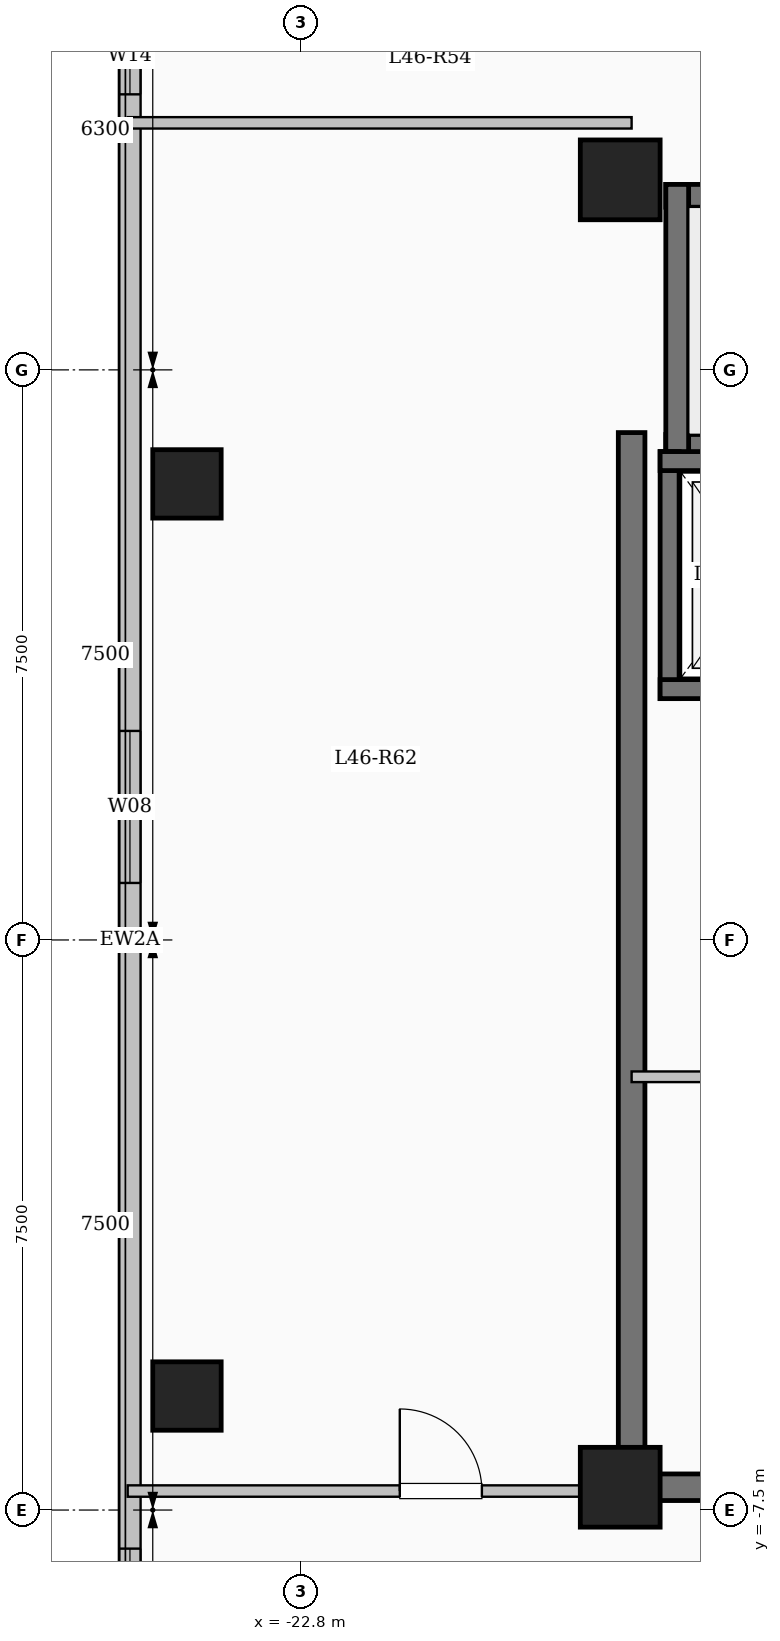
"""IFC4 building model, lengths in metres.
Left out: names, types, materials, properties, quantities, classifications, styles, units other than length and angle.
Written with IfcOpenShell. Run it as: python <this file> out.ifc"""

import sys

from ifc_helpers import new_model, si_unit, direction, frame, frame_2d, origin, origin_2d, place, context, subcontext, project, spatial, rectangle, extrude, element, fill, save


model = new_model("IFC4")
c1 = context("Model", 3, precision=1e-05, world=origin(), true_north=direction((0.0, 1.0)))
c2 = subcontext(c1, "Body", "Model", "MODEL_VIEW")
j1 = project(units=[si_unit("LENGTHUNIT", "METRE"), si_unit("PLANEANGLEUNIT", "RADIAN")], contexts=[c1])
p1 = place(None, origin())
s1 = spatial("IfcSite", under=j1, at=p1, CompositionType="ELEMENT")
p2 = place(p1, origin())
s2 = spatial("IfcBuilding", under=s1, at=p2, CompositionType="ELEMENT")
p3 = place(p2, frame((0.0, 0.0, 169.45)))
s3 = spatial("IfcBuildingStorey", under=s2, at=p3, CompositionType="ELEMENT", Elevation=169.45)
for number, where, z_axis, x_axis in (
    (1, (-18.6, -7.2, 0.0), (0.0, 0.0, 1.0), (1.0, 0.0, 0.0)),
    (2, (-18.6, 10.0, 0.0), (0.0, 0.0, 1.0), (1.0, 0.0, 0.0)),
):
    element("IfcColumn", number, at=place(p3, frame(where, z_axis=z_axis, x_axis=x_axis)), inside=s3, PredefinedType="COLUMN", context=c2, shape_type="SweptSolid", body=[
        extrude(rectangle(XDim=1.05, YDim=1.05, at=origin_2d()), origin(), (0.0, 0.0, 1.0), 3.35),
    ])
for number, where, z_axis, x_axis in (
    (3, (-24.3, -6.0, 0.0), (0.0, 0.0, 1.0), (1.0, 0.0, 0.0)),
    (4, (-24.3, 6.0, 0.0), (0.0, 0.0, 1.0), (1.0, 0.0, 0.0)),
):
    element("IfcColumn", number, at=place(p3, frame(where, z_axis=z_axis, x_axis=x_axis)), inside=s3, PredefinedType="COLUMN", context=c2, shape_type="SweptSolid", body=[
        extrude(rectangle(XDim=0.9, YDim=0.9, at=origin_2d()), origin(), (0.0, 0.0, 1.0), 3.35),
    ])
p4 = place(p3, frame((-25.05, -17.25, 0.0), z_axis=(0.0, 0.0, 1.0), x_axis=(0.0, 1.0, 0.0)))
e5 = element("IfcWall", 5, at=p4, inside=s3, PredefinedType="SOLIDWALL", context=c2, shape_type="SweptSolid", body=[
    extrude(rectangle(XDim=34.5, YDim=0.28, at=frame_2d((17.25, 0.0))), origin(), (0.0, 0.0, 1.0), 3.05),
])
p5 = place(p4, frame((2.35, 0.0, 0.9)))
e6 = element("IfcOpeningElement", 6, at=p5, cuts=e5, PredefinedType="OPENING", context=c2, shape_type="SweptSolid", body=[
    extrude(rectangle(XDim=2.2, YDim=1.75, at=frame_2d((1.1, 0.875))), frame((0.0, 0.15, 0.0), z_axis=(0.0, -1.0, 0.0), x_axis=(1.0, 0.0, 0.0)), (0.0, 0.0, 1.0), 0.3),
])
p6 = place(p4, frame((7.742, 0.0, 0.9)))
e7 = element("IfcOpeningElement", 7, at=p6, cuts=e5, PredefinedType="OPENING", context=c2, shape_type="SweptSolid", body=[
    extrude(rectangle(XDim=1.5, YDim=1.65, at=frame_2d((0.75, 0.825))), frame((0.0, 0.15, 0.0), z_axis=(0.0, -1.0, 0.0), x_axis=(1.0, 0.0, 0.0)), (0.0, 0.0, 1.0), 0.3),
])
p7 = place(p4, frame((18.0, 0.0, 0.9)))
e8 = element("IfcOpeningElement", 8, at=p7, cuts=e5, PredefinedType="OPENING", context=c2, shape_type="SweptSolid", body=[
    extrude(rectangle(XDim=2.0, YDim=1.7, at=frame_2d((1.0, 0.85))), frame((0.0, 0.15, 0.0), z_axis=(0.0, -1.0, 0.0), x_axis=(1.0, 0.0, 0.0)), (0.0, 0.0, 1.0), 0.3),
])
p8 = place(p4, frame((28.375, 0.0, 0.95)))
e9 = element("IfcOpeningElement", 9, at=p8, cuts=e5, PredefinedType="OPENING", context=c2, shape_type="SweptSolid", body=[
    extrude(rectangle(XDim=1.0, YDim=1.5, at=frame_2d((0.5, 0.75))), frame((0.0, 0.15, 0.0), z_axis=(0.0, -1.0, 0.0), x_axis=(1.0, 0.0, 0.0)), (0.0, 0.0, 1.0), 0.3),
])
p9 = place(p4, frame((31.125, 0.0, 0.9)))
e10 = element("IfcOpeningElement", 10, at=p9, cuts=e5, PredefinedType="OPENING", context=c2, shape_type="SweptSolid", body=[
    extrude(rectangle(XDim=2.0, YDim=1.7, at=frame_2d((1.0, 0.85))), frame((0.0, 0.15, 0.0), z_axis=(0.0, -1.0, 0.0), x_axis=(1.0, 0.0, 0.0)), (0.0, 0.0, 1.0), 0.3),
])
p10 = place(p3, frame((-18.0, 9.79, 0.0), z_axis=(0.0, 0.0, 1.0), x_axis=(1.0, 0.0, 0.0)))
e11 = element("IfcWall", 11, at=p10, inside=s3, PredefinedType="SHEAR", context=c2, shape_type="SweptSolid", body=[
    extrude(rectangle(XDim=8.0, YDim=0.3, at=frame_2d((4.0, 0.0))), origin(), (0.0, 0.0, 1.0), 3.35),
])
p11 = place(p3, frame((-18.0, 6.5, 0.0), z_axis=(0.0, 0.0, 1.0), x_axis=(1.0, 0.0, 0.0)))
e12 = element("IfcWall", 12, at=p11, inside=s3, PredefinedType="SHEAR", context=c2, shape_type="SweptSolid", body=[
    extrude(rectangle(XDim=8.0, YDim=0.3, at=frame_2d((4.0, 0.0))), origin(), (0.0, 0.0, 1.0), 3.35),
])
p12 = place(p11, frame((6.45, 0.0, 0.0)))
e13 = element("IfcOpeningElement", 13, at=p12, cuts=e12, PredefinedType="OPENING", context=c2, shape_type="SweptSolid", body=[
    extrude(rectangle(XDim=1.0, YDim=2.15, at=frame_2d((0.5, 1.075))), frame((0.0, 0.16, 0.0), z_axis=(0.0, -1.0, 0.0), x_axis=(1.0, 0.0, 0.0)), (0.0, 0.0, 1.0), 0.32),
])
p13 = place(p3, frame((-17.85, 6.35, 0.0), z_axis=(0.0, 0.0, 1.0), x_axis=(0.0, 1.0, 0.0)))
e14 = element("IfcWall", 14, at=p13, inside=s3, PredefinedType="SHEAR", context=c2, shape_type="SweptSolid", body=[
    extrude(rectangle(XDim=3.59, YDim=0.3, at=frame_2d((1.795, 0.0))), origin(), (0.0, 0.0, 1.0), 3.35),
])
p14 = place(p3, frame((-17.95, 3.175, 0.0), z_axis=(0.0, 0.0, 1.0), x_axis=(0.0, 1.0, 0.0)))
e15 = element("IfcWall", 15, at=p14, inside=s3, PredefinedType="SHEAR", context=c2, shape_type="SweptSolid", body=[
    extrude(rectangle(XDim=3.25, YDim=0.25, at=frame_2d((1.625, 0.0))), origin(), (0.0, 0.0, 1.0), 3.35),
])
for number, where, z_axis, x_axis in (
    (16, (-18.075, 3.3, 0.0), (0.0, 0.0, 1.0), (1.0, 0.0, 0.0)),
    (17, (-18.075, 6.3, 0.0), (0.0, 0.0, 1.0), (1.0, 0.0, 0.0)),
):
    element("IfcWall", number, at=place(p3, frame(where, z_axis=z_axis, x_axis=x_axis)), inside=s3, PredefinedType="SHEAR", context=c2, shape_type="SweptSolid", body=[
        extrude(rectangle(XDim=2.55, YDim=0.25, at=frame_2d((1.275, 0.0))), origin(), (0.0, 0.0, 1.0), 3.35),
    ])
p15 = place(p3, frame((-18.45, -7.375, 0.0), z_axis=(0.0, 0.0, 1.0), x_axis=(0.0, 1.0, 0.0)))
e18 = element("IfcWall", 18, at=p15, inside=s3, PredefinedType="SHEAR", context=c2, shape_type="SweptSolid", body=[
    extrude(rectangle(XDim=14.05, YDim=0.35, at=frame_2d((7.025, 0.0))), origin(), (0.0, 0.0, 1.0), 3.35),
])
p16 = place(p3, frame((-18.625, -7.2, 0.0), z_axis=(0.0, 0.0, 1.0), x_axis=(1.0, 0.0, 0.0)))
e19 = element("IfcWall", 19, at=p16, inside=s3, PredefinedType="SHEAR", context=c2, shape_type="SweptSolid", body=[
    extrude(rectangle(XDim=8.55, YDim=0.35, at=frame_2d((4.275, 0.0))), origin(), (0.0, 0.0, 1.0), 3.35),
])
p17 = place(p3, frame((-18.45, -1.8, 0.0), z_axis=(0.0, 0.0, 1.0), x_axis=(1.0, 0.0, 0.0)))
e20 = element("IfcWall", 20, at=p17, inside=s3, PredefinedType="PARTITIONING", context=c2, shape_type="SweptSolid", body=[
    extrude(rectangle(XDim=3.05, YDim=0.14, at=frame_2d((1.525, 0.0))), origin(), (0.0, 0.0, 1.0), 3.05),
])
p18 = place(p17, frame((1.05, 0.0, 0.0)))
e21 = element("IfcOpeningElement", 21, at=p18, cuts=e20, PredefinedType="OPENING", context=c2, shape_type="SweptSolid", body=[
    extrude(rectangle(XDim=0.9, YDim=2.08, at=frame_2d((0.45, 1.04))), frame((0.0, 0.08, 0.0), z_axis=(0.0, -1.0, 0.0), x_axis=(1.0, 0.0, 0.0)), (0.0, 0.0, 1.0), 0.16),
])
p19 = place(p3, frame((-25.08, -7.25, 0.0), z_axis=(0.0, 0.0, 1.0), x_axis=(1.0, 0.0, 0.0)))
e22 = element("IfcWall", 22, at=p19, inside=s3, PredefinedType="PARTITIONING", context=c2, shape_type="SweptSolid", body=[
    extrude(rectangle(XDim=6.63, YDim=0.15, at=frame_2d((3.315, 0.0))), origin(), (0.0, 0.0, 1.0), 3.05),
])
p20 = place(p19, frame((3.58, 0.0, 0.0)))
e23 = element("IfcOpeningElement", 23, at=p20, cuts=e22, PredefinedType="OPENING", context=c2, shape_type="SweptSolid", body=[
    extrude(rectangle(XDim=1.08, YDim=2.15, at=frame_2d((0.54, 1.075))), frame((0.0, 0.085, 0.0), z_axis=(0.0, -1.0, 0.0), x_axis=(1.0, 0.0, 0.0)), (0.0, 0.0, 1.0), 0.17),
])
p21 = place(p3, frame((-25.08, 10.75, 0.0), z_axis=(0.0, 0.0, 1.0), x_axis=(1.0, 0.0, 0.0)))
e24 = element("IfcWall", 24, at=p21, inside=s3, PredefinedType="PARTITIONING", context=c2, shape_type="SweptSolid", body=[
    extrude(rectangle(XDim=6.63, YDim=0.15, at=frame_2d((3.315, 0.0))), origin(), (0.0, 0.0, 1.0), 3.05),
])
p22 = place(p6, origin())
e25 = element("IfcWindow", 25, at=p22, inside=s3, PartitioningType="SINGLE_PANEL", PredefinedType="WINDOW", context=c2, shape_type="SweptSolid", body=[
    extrude(rectangle(XDim=1.5, YDim=1.65, at=frame_2d((0.75, 0.825))), frame((0.0, 0.03, 0.0), z_axis=(0.0, -1.0, 0.0), x_axis=(1.0, 0.0, 0.0)), (0.0, 0.0, 1.0), 0.06),
])
fill(e7, e25)
p23 = place(p7, origin())
e26 = element("IfcWindow", 26, at=p23, inside=s3, PartitioningType="SINGLE_PANEL", PredefinedType="WINDOW", context=c2, shape_type="SweptSolid", body=[
    extrude(rectangle(XDim=2.0, YDim=1.7, at=frame_2d((1.0, 0.85))), frame((0.0, 0.03, 0.0), z_axis=(0.0, -1.0, 0.0), x_axis=(1.0, 0.0, 0.0)), (0.0, 0.0, 1.0), 0.06),
])
fill(e8, e26)
p24 = place(p8, origin())
e27 = element("IfcWindow", 27, at=p24, inside=s3, PartitioningType="SINGLE_PANEL", PredefinedType="WINDOW", context=c2, shape_type="SweptSolid", body=[
    extrude(rectangle(XDim=1.0, YDim=1.5, at=frame_2d((0.5, 0.75))), frame((0.0, 0.03, 0.0), z_axis=(0.0, -1.0, 0.0), x_axis=(1.0, 0.0, 0.0)), (0.0, 0.0, 1.0), 0.06),
])
fill(e9, e27)
p25 = place(p20, origin())
e28 = element("IfcDoor", 28, at=p25, inside=s3, OperationType="SINGLE_SWING_LEFT", PredefinedType="DOOR", context=c2, shape_type="SweptSolid", body=[
    extrude(rectangle(XDim=1.08, YDim=2.15, at=frame_2d((0.54, 1.075))), frame((0.0, 0.025, 0.0), z_axis=(0.0, -1.0, 0.0), x_axis=(1.0, 0.0, 0.0)), (0.0, 0.0, 1.0), 0.05),
])
fill(e23, e28)
save(model, sys.argv[1])
